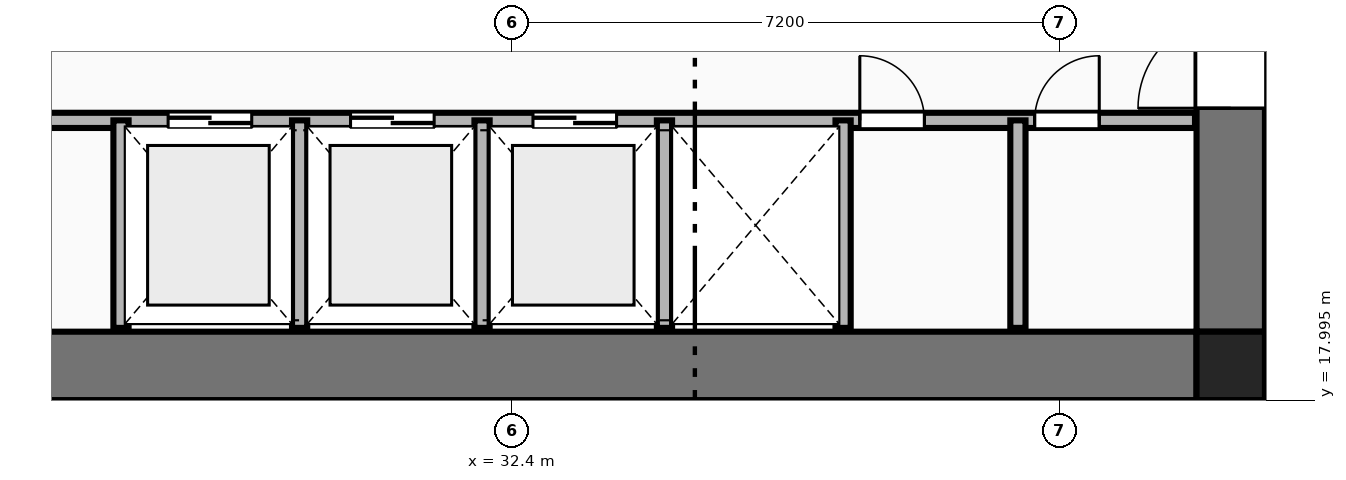
"""IFC4 building model, lengths in metres.
Left out: names, types, materials, properties, quantities, classifications, styles, units other than length and angle.
Written with IfcOpenShell. Run it as: python <this file> out.ifc"""

import sys

from ifc_helpers import new_model, si_unit, direction, frame, frame_2d, origin, origin_2d, place, context, subcontext, project, spatial, rectangle, extrude, element, fill, save


model = new_model("IFC4")
c1 = context("Model", 3, precision=1e-05, world=origin(), true_north=direction((0.0, 1.0)))
c2 = subcontext(c1, "Body", "Model", "MODEL_VIEW")
j1 = project(units=[si_unit("LENGTHUNIT", "METRE"), si_unit("PLANEANGLEUNIT", "RADIAN")], contexts=[c1])
p1 = place(None, origin())
s1 = spatial("IfcSite", under=j1, at=p1, CompositionType="ELEMENT")
p2 = place(p1, origin())
s2 = spatial("IfcBuilding", under=s1, at=p2, CompositionType="ELEMENT")
p3 = place(p2, frame((0.0, 0.0, 60.4)))
s3 = spatial("IfcBuildingStorey", under=s2, at=p3, CompositionType="ELEMENT", Elevation=60.4)
p4 = place(p3, frame((41.85, 18.45, 0.0), z_axis=(0.0, 0.0, 1.0), x_axis=(1.0, 0.0, 0.0)))
e1 = element("IfcColumn", 1, at=p4, inside=s3, PredefinedType="COLUMN", context=c2, shape_type="SweptSolid", body=[
    extrude(rectangle(XDim=0.9, YDim=0.9, at=origin_2d()), origin(), (0.0, 0.0, 1.0), 3.55),
])
p5 = place(p3, frame((23.4, 18.45, 0.0), z_axis=(0.0, 0.0, 1.0), x_axis=(1.0, 0.0, 0.0)))
e2 = element("IfcWall", 2, at=p5, inside=s3, PredefinedType="SHEAR", context=c2, shape_type="SweptSolid", body=[
    extrude(rectangle(XDim=18.0, YDim=0.9, at=frame_2d((9.0, 0.0))), origin(), (0.0, 0.0, 1.0), 3.33),
])
p6 = place(p3, frame((41.85, 18.9, 0.0), z_axis=(0.0, 0.0, 1.0), x_axis=(0.0, 1.0, 0.0)))
e3 = element("IfcWall", 3, at=p6, inside=s3, PredefinedType="SHEAR", context=c2, shape_type="SweptSolid", body=[
    extrude(rectangle(XDim=14.0, YDim=0.9, at=frame_2d((7.0, 0.0))), origin(), (0.0, 0.0, 1.0), 3.33),
])
p7 = place(p6, frame((2.94, 0.0, 0.0)))
e4 = element("IfcOpeningElement", 4, at=p7, cuts=e3, PredefinedType="OPENING", context=c2, shape_type="SweptSolid", body=[
    extrude(rectangle(XDim=1.22, YDim=2.25, at=frame_2d((0.61, 1.125))), frame((0.0, 0.46, 0.0), z_axis=(0.0, -1.0, 0.0), x_axis=(1.0, 0.0, 0.0)), (0.0, 0.0, 1.0), 0.92),
])
p8 = place(p3, frame((23.42, 21.68, 0.0), z_axis=(0.0, 0.0, 1.0), x_axis=(1.0, 0.0, 0.0)))
e5 = element("IfcWall", 5, at=p8, inside=s3, PredefinedType="PLUMBINGWALL", context=c2, shape_type="SweptSolid", body=[
    extrude(rectangle(XDim=17.96, YDim=0.2, at=frame_2d((8.98, 0.0))), origin(), (0.0, 0.0, 1.0), 3.33),
])
p9 = place(p8, frame((4.45, 0.0, 0.0)))
e6 = element("IfcOpeningElement", 6, at=p9, cuts=e5, PredefinedType="OPENING", context=c2, shape_type="SweptSolid", body=[
    extrude(rectangle(XDim=1.1, YDim=2.2, at=frame_2d((0.55, 1.1))), frame((0.0, 0.11, 0.0), z_axis=(0.0, -1.0, 0.0), x_axis=(1.0, 0.0, 0.0)), (0.0, 0.0, 1.0), 0.22),
])
p10 = place(p8, frame((6.85, 0.0, 0.0)))
e7 = element("IfcOpeningElement", 7, at=p10, cuts=e5, PredefinedType="OPENING", context=c2, shape_type="SweptSolid", body=[
    extrude(rectangle(XDim=1.1, YDim=2.2, at=frame_2d((0.55, 1.1))), frame((0.0, 0.11, 0.0), z_axis=(0.0, -1.0, 0.0), x_axis=(1.0, 0.0, 0.0)), (0.0, 0.0, 1.0), 0.22),
])
p11 = place(p8, frame((9.25, 0.0, 0.0)))
e8 = element("IfcOpeningElement", 8, at=p11, cuts=e5, PredefinedType="OPENING", context=c2, shape_type="SweptSolid", body=[
    extrude(rectangle(XDim=1.1, YDim=2.2, at=frame_2d((0.55, 1.1))), frame((0.0, 0.11, 0.0), z_axis=(0.0, -1.0, 0.0), x_axis=(1.0, 0.0, 0.0)), (0.0, 0.0, 1.0), 0.22),
])
p12 = place(p8, frame((1.2, 0.0, 0.0)))
e9 = element("IfcOpeningElement", 9, at=p12, cuts=e5, PredefinedType="OPENING", context=c2, shape_type="SweptSolid", body=[
    extrude(rectangle(XDim=0.85, YDim=2.05, at=frame_2d((0.425, 1.025))), frame((0.0, 0.11, 0.0), z_axis=(0.0, -1.0, 0.0), x_axis=(1.0, 0.0, 0.0)), (0.0, 0.0, 1.0), 0.22),
])
p13 = place(p8, frame((13.55, 0.0, 0.0)))
e10 = element("IfcOpeningElement", 10, at=p13, cuts=e5, PredefinedType="OPENING", context=c2, shape_type="SweptSolid", body=[
    extrude(rectangle(XDim=0.85, YDim=2.05, at=frame_2d((0.425, 1.025))), frame((0.0, 0.11, 0.0), z_axis=(0.0, -1.0, 0.0), x_axis=(1.0, 0.0, 0.0)), (0.0, 0.0, 1.0), 0.22),
])
p14 = place(p8, frame((15.85, 0.0, 0.0)))
e11 = element("IfcOpeningElement", 11, at=p14, cuts=e5, PredefinedType="OPENING", context=c2, shape_type="SweptSolid", body=[
    extrude(rectangle(XDim=0.85, YDim=2.05, at=frame_2d((0.425, 1.025))), frame((0.0, 0.11, 0.0), z_axis=(0.0, -1.0, 0.0), x_axis=(1.0, 0.0, 0.0)), (0.0, 0.0, 1.0), 0.22),
])
for number, where, z_axis, x_axis in (
    (12, (27.25, 18.95, 0.0), (0.0, 0.0, 1.0), (0.0, 1.0, 0.0)),
    (13, (29.6, 18.95, 0.0), (0.0, 0.0, 1.0), (0.0, 1.0, 0.0)),
    (14, (32.0, 18.95, 0.0), (0.0, 0.0, 1.0), (0.0, 1.0, 0.0)),
    (15, (34.4, 18.95, 0.0), (0.0, 0.0, 1.0), (0.0, 1.0, 0.0)),
    (16, (36.75, 18.95, 0.0), (0.0, 0.0, 1.0), (0.0, 1.0, 0.0)),
    (17, (39.05, 18.95, 0.0), (0.0, 0.0, 1.0), (0.0, 1.0, 0.0)),
):
    element("IfcWall", number, at=place(p3, frame(where, z_axis=z_axis, x_axis=x_axis)), inside=s3, PredefinedType="PLUMBINGWALL", context=c2, shape_type="SweptSolid", body=[
        extrude(rectangle(XDim=2.73, YDim=0.2, at=frame_2d((1.365, 0.0))), origin(), (0.0, 0.0, 1.0), 3.33),
    ])
p15 = place(p7, origin())
e18 = element("IfcDoor", 18, at=p15, inside=s3, OperationType="SINGLE_SWING_LEFT", PredefinedType="DOOR", context=c2, shape_type="SweptSolid", body=[
    extrude(rectangle(XDim=1.22, YDim=2.25, at=frame_2d((0.61, 1.125))), frame((0.0, 0.025, 0.0), z_axis=(0.0, -1.0, 0.0), x_axis=(1.0, 0.0, 0.0)), (0.0, 0.0, 1.0), 0.05),
])
fill(e4, e18)
p16 = place(p9, origin())
e19 = element("IfcDoor", 19, at=p16, inside=s3, OperationType="DOUBLE_DOOR_SLIDING", PredefinedType="DOOR", context=c2, shape_type="SweptSolid", body=[
    extrude(rectangle(XDim=1.1, YDim=2.2, at=frame_2d((0.55, 1.1))), frame((0.0, 0.025, 0.0), z_axis=(0.0, -1.0, 0.0), x_axis=(1.0, 0.0, 0.0)), (0.0, 0.0, 1.0), 0.05),
])
fill(e6, e19)
p17 = place(p10, origin())
e20 = element("IfcDoor", 20, at=p17, inside=s3, OperationType="DOUBLE_DOOR_SLIDING", PredefinedType="DOOR", context=c2, shape_type="SweptSolid", body=[
    extrude(rectangle(XDim=1.1, YDim=2.2, at=frame_2d((0.55, 1.1))), frame((0.0, 0.025, 0.0), z_axis=(0.0, -1.0, 0.0), x_axis=(1.0, 0.0, 0.0)), (0.0, 0.0, 1.0), 0.05),
])
fill(e7, e20)
p18 = place(p11, origin())
e21 = element("IfcDoor", 21, at=p18, inside=s3, OperationType="DOUBLE_DOOR_SLIDING", PredefinedType="DOOR", context=c2, shape_type="SweptSolid", body=[
    extrude(rectangle(XDim=1.1, YDim=2.2, at=frame_2d((0.55, 1.1))), frame((0.0, 0.025, 0.0), z_axis=(0.0, -1.0, 0.0), x_axis=(1.0, 0.0, 0.0)), (0.0, 0.0, 1.0), 0.05),
])
fill(e8, e21)
p19 = place(p13, origin())
e22 = element("IfcDoor", 22, at=p19, inside=s3, OperationType="SINGLE_SWING_LEFT", PredefinedType="DOOR", context=c2, shape_type="SweptSolid", body=[
    extrude(rectangle(XDim=0.85, YDim=2.05, at=frame_2d((0.425, 1.025))), frame((0.0, 0.025, 0.0), z_axis=(0.0, -1.0, 0.0), x_axis=(1.0, 0.0, 0.0)), (0.0, 0.0, 1.0), 0.05),
])
fill(e10, e22)
p20 = place(p14, origin())
e23 = element("IfcDoor", 23, at=p20, inside=s3, OperationType="SINGLE_SWING_RIGHT", PredefinedType="DOOR", context=c2, shape_type="SweptSolid", body=[
    extrude(rectangle(XDim=0.85, YDim=2.05, at=frame_2d((0.425, 1.025))), frame((0.0, 0.025, 0.0), z_axis=(0.0, -1.0, 0.0), x_axis=(1.0, 0.0, 0.0)), (0.0, 0.0, 1.0), 0.05),
])
fill(e11, e23)
save(model, sys.argv[1])
